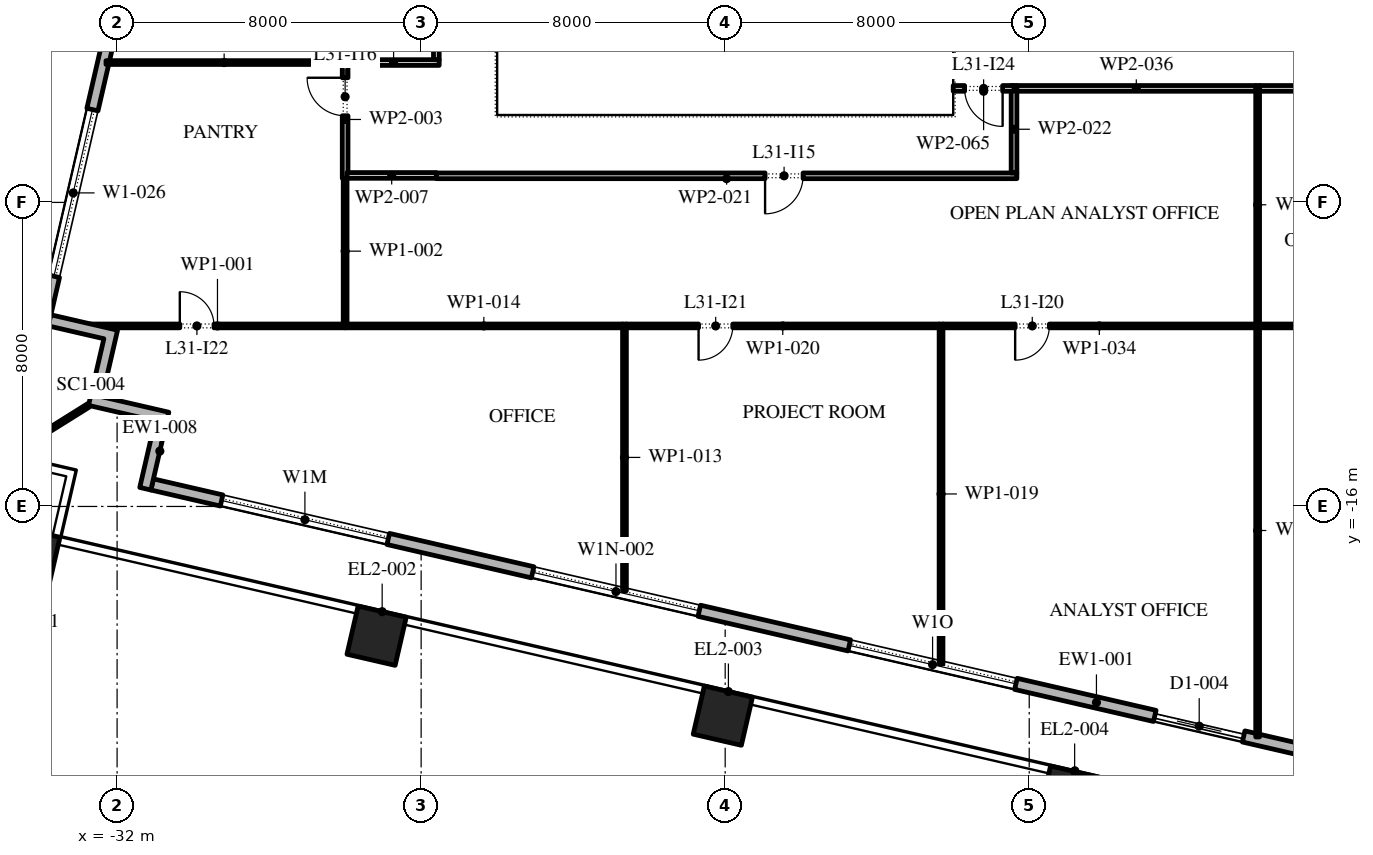
"""IFC4 building model, lengths in metres.
Left out: names, types, materials, properties, quantities, classifications, styles, units other than length and angle.
Written with IfcOpenShell. Run it as: python <this file> out.ifc"""

import sys

from ifc_helpers import new_model, si_unit, direction, frame, frame_2d, origin, origin_2d, place, context, subcontext, project, spatial, polyline, rectangle, outline, extrude, element, fill, save


model = new_model("IFC4")
c1 = context("Model", 3, precision=1e-05, world=origin(), true_north=direction((0.0, 1.0)))
c2 = subcontext(c1, "Body", "Model", "MODEL_VIEW")
j1 = project(units=[si_unit("LENGTHUNIT", "METRE"), si_unit("PLANEANGLEUNIT", "RADIAN")], contexts=[c1])
p1 = place(None, origin())
s1 = spatial("IfcSite", under=j1, at=p1, CompositionType="ELEMENT")
p2 = place(p1, origin())
s2 = spatial("IfcBuilding", under=s1, at=p2, CompositionType="ELEMENT")
p3 = place(p2, frame((0.0, 0.0, 143.4)))
s3 = spatial("IfcBuildingStorey", under=s2, at=p3, CompositionType="ELEMENT", Elevation=143.4)
for number, where, z_axis, x_axis in (
    (1, (-34.282, -17.298, 0.0), (0.0, 0.0, 1.0), (0.974, -0.225, 0.0)),
    (2, (-25.172, -19.402, 0.0), (0.0, 0.0, 1.0), (0.974, -0.225, 0.0)),
    (3, (-16.061, -21.505, 0.0), (0.0, 0.0, 1.0), (0.974, -0.225, 0.0)),
    (4, (-6.951, -23.608, 0.0), (0.0, 0.0, 1.0), (0.974, -0.225, 0.0)),
):
    element("IfcColumn", number, at=place(p3, frame(where, z_axis=z_axis, x_axis=x_axis)), inside=s3, PredefinedType="COLUMN", context=c2, shape_type="SweptSolid", body=[
        extrude(rectangle(XDim=1.3, YDim=1.3, at=origin_2d()), origin(), (0.0, 0.0, 1.0), 4.2),
    ])
p4 = place(p3, frame((-31.078, -15.421, 0.0), z_axis=(0.0, 0.0, 1.0), x_axis=(0.974370456532, -0.224949357493, 0.0)))
e5 = element("IfcWall", 5, at=p4, inside=s3, PredefinedType="STANDARD", context=c2, shape_type="SweptSolid", body=[
    extrude(rectangle(XDim=51.0, YDim=0.3, at=frame_2d((25.5, 0.0))), origin(), (0.0, 0.0, 1.0), 4.0),
])
p5 = place(p4, frame((1.875, 0.0, 0.45)))
e6 = element("IfcOpeningElement", 6, at=p5, cuts=e5, PredefinedType="OPENING", context=c2, shape_type="SweptSolid", body=[
    extrude(rectangle(XDim=4.5, YDim=2.575, at=frame_2d((2.25, 1.288))), frame((0.0, 0.16, 0.0), z_axis=(0.0, -1.0, 0.0), x_axis=(1.0, 0.0, 0.0)), (0.0, 0.0, 1.0), 0.32),
])
p6 = place(p4, frame((10.275, 0.0, 0.45)))
e7 = element("IfcOpeningElement", 7, at=p6, cuts=e5, PredefinedType="OPENING", context=c2, shape_type="SweptSolid", body=[
    extrude(rectangle(XDim=4.5, YDim=2.525, at=frame_2d((2.25, 1.262))), frame((0.0, 0.16, 0.0), z_axis=(0.0, -1.0, 0.0), x_axis=(1.0, 0.0, 0.0)), (0.0, 0.0, 1.0), 0.32),
])
p7 = place(p4, frame((18.825, 0.0, 0.45)))
e8 = element("IfcOpeningElement", 8, at=p7, cuts=e5, PredefinedType="OPENING", context=c2, shape_type="SweptSolid", body=[
    extrude(rectangle(XDim=4.5, YDim=2.5, at=frame_2d((2.25, 1.25))), frame((0.0, 0.16, 0.0), z_axis=(0.0, -1.0, 0.0), x_axis=(1.0, 0.0, 0.0)), (0.0, 0.0, 1.0), 0.32),
])
p8 = place(p4, frame((27.075, 0.0, 0.0)))
e9 = element("IfcOpeningElement", 9, at=p8, cuts=e5, PredefinedType="OPENING", context=c2, shape_type="SweptSolid", body=[
    extrude(rectangle(XDim=2.4, YDim=3.5, at=frame_2d((1.2, 1.75))), frame((0.0, 0.16, 0.0), z_axis=(0.0, -1.0, 0.0), x_axis=(1.0, 0.0, 0.0)), (0.0, 0.0, 1.0), 0.32),
])
p9 = place(p4, frame((35.925, 0.0, 0.45)))
e10 = element("IfcOpeningElement", 10, at=p9, cuts=e5, PredefinedType="OPENING", context=c2, shape_type="SweptSolid", body=[
    extrude(rectangle(XDim=4.5, YDim=2.45, at=frame_2d((2.25, 1.225))), frame((0.0, 0.16, 0.0), z_axis=(0.0, -1.0, 0.0), x_axis=(1.0, 0.0, 0.0)), (0.0, 0.0, 1.0), 0.32),
])
p10 = place(p4, frame((44.475, 0.0, 0.45)))
e11 = element("IfcOpeningElement", 11, at=p10, cuts=e5, PredefinedType="OPENING", context=c2, shape_type="SweptSolid", body=[
    extrude(rectangle(XDim=4.5, YDim=2.45, at=frame_2d((2.25, 1.225))), frame((0.0, 0.16, 0.0), z_axis=(0.0, -1.0, 0.0), x_axis=(1.0, 0.0, 0.0)), (0.0, 0.0, 1.0), 0.32),
])
p11 = place(p3, frame((-22.82, 37.016, 0.0), z_axis=(0.0, 0.0, 1.0), x_axis=(-0.224953880882, -0.974369412223, 0.0)))
e12 = element("IfcWall", 12, at=p11, inside=s3, PredefinedType="STANDARD", context=c2, shape_type="SweptSolid", body=[
    extrude(rectangle(XDim=49.5, YDim=0.3, at=frame_2d((24.75, 0.0))), origin(), (0.0, 0.0, 1.0), 4.0),
])
p12 = place(p11, frame((1.157, 0.0, 0.45)))
e13 = element("IfcOpeningElement", 13, at=p12, cuts=e12, PredefinedType="OPENING", context=c2, shape_type="SweptSolid", body=[
    extrude(rectangle(XDim=4.5, YDim=3.05, at=frame_2d((2.25, 1.525))), frame((0.0, 0.16, 0.0), z_axis=(0.0, -1.0, 0.0), x_axis=(1.0, 0.0, 0.0)), (0.0, 0.0, 1.0), 0.32),
])
p13 = place(p11, frame((8.121, 0.0, 0.45)))
e14 = element("IfcOpeningElement", 14, at=p13, cuts=e12, PredefinedType="OPENING", context=c2, shape_type="SweptSolid", body=[
    extrude(rectangle(XDim=4.5, YDim=3.05, at=frame_2d((2.25, 1.525))), frame((0.0, 0.16, 0.0), z_axis=(0.0, -1.0, 0.0), x_axis=(1.0, 0.0, 0.0)), (0.0, 0.0, 1.0), 0.32),
])
p14 = place(p11, frame((15.236, 0.0, 0.45)))
e15 = element("IfcOpeningElement", 15, at=p14, cuts=e12, PredefinedType="OPENING", context=c2, shape_type="SweptSolid", body=[
    extrude(rectangle(XDim=4.5, YDim=3.05, at=frame_2d((2.25, 1.525))), frame((0.0, 0.16, 0.0), z_axis=(0.0, -1.0, 0.0), x_axis=(1.0, 0.0, 0.0)), (0.0, 0.0, 1.0), 0.32),
])
p15 = place(p11, frame((23.4, 0.0, 0.0)))
e16 = element("IfcOpeningElement", 16, at=p15, cuts=e12, PredefinedType="OPENING", context=c2, shape_type="SweptSolid", body=[
    extrude(rectangle(XDim=2.4, YDim=3.5, at=frame_2d((1.2, 1.75))), frame((0.0, 0.16, 0.0), z_axis=(0.0, -1.0, 0.0), x_axis=(1.0, 0.0, 0.0)), (0.0, 0.0, 1.0), 0.32),
])
p16 = place(p11, frame((29.464, 0.0, 0.45)))
e17 = element("IfcOpeningElement", 17, at=p16, cuts=e12, PredefinedType="OPENING", context=c2, shape_type="SweptSolid", body=[
    extrude(rectangle(XDim=4.5, YDim=2.875, at=frame_2d((2.25, 1.438))), frame((0.0, 0.16, 0.0), z_axis=(0.0, -1.0, 0.0), x_axis=(1.0, 0.0, 0.0)), (0.0, 0.0, 1.0), 0.32),
])
p17 = place(p11, frame((36.579, 0.0, 0.45)))
e18 = element("IfcOpeningElement", 18, at=p17, cuts=e12, PredefinedType="OPENING", context=c2, shape_type="SweptSolid", body=[
    extrude(rectangle(XDim=4.5, YDim=2.675, at=frame_2d((2.25, 1.337))), frame((0.0, 0.16, 0.0), z_axis=(0.0, -1.0, 0.0), x_axis=(1.0, 0.0, 0.0)), (0.0, 0.0, 1.0), 0.32),
])
p18 = place(p11, frame((43.693, 0.0, 0.45)))
e19 = element("IfcOpeningElement", 19, at=p18, cuts=e12, PredefinedType="OPENING", context=c2, shape_type="SweptSolid", body=[
    extrude(rectangle(XDim=4.5, YDim=3.05, at=frame_2d((2.25, 1.525))), frame((0.0, 0.16, 0.0), z_axis=(0.0, -1.0, 0.0), x_axis=(1.0, 0.0, 0.0)), (0.0, 0.0, 1.0), 0.32),
])
p19 = place(p3, origin())
e20 = element("IfcWall", 20, at=p19, inside=s3, PredefinedType="STANDARD", context=c2, shape_type="SweptSolid", body=[
    extrude(outline(polyline([(-32.393, -13.116), (-30.639, -13.521), (-31.111, -15.567), (-31.404, -15.5), (-30.999, -13.746), (-32.753, -13.341), (-32.348, -11.587), (-33.809, -11.25), (-33.742, -10.957), (-31.988, -11.362), (-32.393, -13.116)])), origin(), (0.0, 0.0, 1.0), 4.0),
])
p20 = place(p3, frame((-32.753, -13.341, -0.05), z_axis=(0.0, 0.0, 1.0), x_axis=(-0.848059759764, -0.529900598103, 0.0)))
e21 = element("IfcWall", 21, at=p20, inside=s3, PredefinedType="STANDARD", context=c2, shape_type="SweptSolid", body=[
    extrude(rectangle(XDim=2.455, YDim=0.1, at=frame_2d((1.228, 0.0))), origin(), (0.0, 0.0, 1.0), 4.05),
])
p21 = place(p3, frame((-26.0, -11.25, 0.0), z_axis=(0.0, 0.0, 1.0), x_axis=(-1.0, 0.0, 0.0)))
e22 = element("IfcWall", 22, at=p21, inside=s3, PredefinedType="PARTITIONING", context=c2, shape_type="SweptSolid", body=[
    extrude(rectangle(XDim=6.718, YDim=0.1, at=frame_2d((3.359, 0.0))), origin(), (0.0, 0.0, 1.0), 4.0),
])
p22 = place(p21, frame((3.45, 0.0, 0.0)))
e23 = element("IfcOpeningElement", 23, at=p22, cuts=e22, PredefinedType="OPENING", context=c2, shape_type="SweptSolid", body=[
    extrude(rectangle(XDim=0.9, YDim=2.1, at=frame_2d((0.45, 1.05))), frame((0.0, 0.06, 0.0), z_axis=(0.0, -1.0, 0.0), x_axis=(1.0, 0.0, 0.0)), (0.0, 0.0, 1.0), 0.12),
])
p23 = place(p3, frame((-26.0, -11.2, 0.0), z_axis=(0.0, 0.0, 1.0), x_axis=(0.0, 1.0, 0.0)))
e24 = element("IfcWall", 24, at=p23, inside=s3, PredefinedType="PARTITIONING", context=c2, shape_type="SweptSolid", body=[
    extrude(rectangle(XDim=3.835, YDim=0.1, at=frame_2d((1.917, 0.0))), origin(), (0.0, 0.0, 1.0), 4.0),
])
p24 = place(p3, frame((-26.0, -7.365, 0.0), z_axis=(0.0, 0.0, 1.0), x_axis=(0.0, 1.0, 0.0)))
e25 = element("IfcWall", 25, at=p24, inside=s3, PredefinedType="PARTITIONING", context=c2, shape_type="SweptSolid", body=[
    extrude(rectangle(XDim=3.095, YDim=0.15, at=frame_2d((1.547, 0.0))), origin(), (0.0, 0.0, 1.0), 4.0),
])
p25 = place(p24, frame((1.645, 0.0, 0.0)))
e26 = element("IfcOpeningElement", 26, at=p25, cuts=e25, PredefinedType="OPENING", context=c2, shape_type="SweptSolid", body=[
    extrude(rectangle(XDim=1.0, YDim=2.1, at=frame_2d((0.5, 1.05))), frame((0.0, 0.085, 0.0), z_axis=(0.0, -1.0, 0.0), x_axis=(1.0, 0.0, 0.0)), (0.0, 0.0, 1.0), 0.17),
])
p26 = place(p3, frame((-26.075, -4.32, 0.0), z_axis=(0.0, 0.0, 1.0), x_axis=(-1.0, 0.0, 0.0)))
e27 = element("IfcWall", 27, at=p26, inside=s3, PredefinedType="PARTITIONING", context=c2, shape_type="SweptSolid", body=[
    extrude(rectangle(XDim=6.217, YDim=0.1, at=frame_2d((3.108, 0.0))), origin(), (0.0, 0.0, 1.0), 4.0),
])
p27 = place(p3, frame((-25.925, -4.32, 0.0), z_axis=(0.0, 0.0, 1.0), x_axis=(1.0, 0.0, 0.0)))
e28 = element("IfcWall", 28, at=p27, inside=s3, PredefinedType="PARTITIONING", context=c2, shape_type="SweptSolid", body=[
    extrude(rectangle(XDim=2.4, YDim=0.15, at=frame_2d((1.2, 0.0))), origin(), (0.0, 0.0, 1.0), 4.0),
])
p28 = place(p3, frame((-23.6, -7.29, 0.0), z_axis=(0.0, 0.0, 1.0), x_axis=(-1.0, 0.0, 0.0)))
e29 = element("IfcWall", 29, at=p28, inside=s3, PredefinedType="PARTITIONING", context=c2, shape_type="SweptSolid", body=[
    extrude(rectangle(XDim=2.35, YDim=0.15, at=frame_2d((1.175, 0.0))), origin(), (0.0, 0.0, 1.0), 4.0),
])
p29 = place(p3, frame((-23.6, -4.245, 0.0), z_axis=(0.0, 0.0, 1.0), x_axis=(0.0, 1.0, 0.0)))
e30 = element("IfcWall", 30, at=p29, inside=s3, PredefinedType="PARTITIONING", context=c2, shape_type="SweptSolid", body=[
    extrude(rectangle(XDim=14.685, YDim=0.15, at=frame_2d((7.343, 0.0))), origin(), (0.0, 0.0, 1.0), 4.0),
])
p30 = place(p29, frame((3.735, 0.0, 0.0)))
e31 = element("IfcOpeningElement", 31, at=p30, cuts=e30, PredefinedType="OPENING", context=c2, shape_type="SweptSolid", body=[
    extrude(rectangle(XDim=1.0, YDim=2.1, at=frame_2d((0.5, 1.05))), frame((0.0, 0.085, 0.0), z_axis=(0.0, -1.0, 0.0), x_axis=(1.0, 0.0, 0.0)), (0.0, 0.0, 1.0), 0.17),
])
p31 = place(p3, frame((-18.65, -18.219, 0.0), z_axis=(0.0, 0.0, 1.0), x_axis=(0.0, 1.0, 0.0)))
e32 = element("IfcWall", 32, at=p31, inside=s3, PredefinedType="PARTITIONING", context=c2, shape_type="SweptSolid", body=[
    extrude(rectangle(XDim=7.019, YDim=0.1, at=frame_2d((3.51, 0.0))), origin(), (0.0, 0.0, 1.0), 4.0),
])
p32 = place(p3, frame((-18.7, -11.25, 0.0), z_axis=(0.0, 0.0, 1.0), x_axis=(-1.0, 0.0, 0.0)))
e33 = element("IfcWall", 33, at=p32, inside=s3, PredefinedType="PARTITIONING", context=c2, shape_type="SweptSolid", body=[
    extrude(rectangle(XDim=7.3, YDim=0.1, at=frame_2d((3.65, 0.0))), origin(), (0.0, 0.0, 1.0), 4.0),
])
p33 = place(p3, frame((-10.32, -20.142, 0.0), z_axis=(0.0, 0.0, 1.0), x_axis=(0.0, 1.0, 0.0)))
e34 = element("IfcWall", 34, at=p33, inside=s3, PredefinedType="PARTITIONING", context=c2, shape_type="SweptSolid", body=[
    extrude(rectangle(XDim=8.942, YDim=0.1, at=frame_2d((4.471, 0.0))), origin(), (0.0, 0.0, 1.0), 4.0),
])
p34 = place(p3, frame((-10.37, -11.25, 0.0), z_axis=(0.0, 0.0, 1.0), x_axis=(-1.0, 0.0, 0.0)))
e35 = element("IfcWall", 35, at=p34, inside=s3, PredefinedType="PARTITIONING", context=c2, shape_type="SweptSolid", body=[
    extrude(rectangle(XDim=8.23, YDim=0.1, at=frame_2d((4.115, 0.0))), origin(), (0.0, 0.0, 1.0), 4.0),
])
p35 = place(p34, frame((5.43, 0.0, 0.0)))
e36 = element("IfcOpeningElement", 36, at=p35, cuts=e35, PredefinedType="OPENING", context=c2, shape_type="SweptSolid", body=[
    extrude(rectangle(XDim=0.9, YDim=2.1, at=frame_2d((0.45, 1.05))), frame((0.0, 0.06, 0.0), z_axis=(0.0, -1.0, 0.0), x_axis=(1.0, 0.0, 0.0)), (0.0, 0.0, 1.0), 0.12),
])
p36 = place(p3, frame((-8.325, -7.3, 0.0), z_axis=(0.0, 0.0, 1.0), x_axis=(-1.0, 0.0, 0.0)))
e37 = element("IfcWall", 37, at=p36, inside=s3, PredefinedType="PARTITIONING", context=c2, shape_type="SweptSolid", body=[
    extrude(rectangle(XDim=15.275, YDim=0.15, at=frame_2d((7.638, 0.0))), origin(), (0.0, 0.0, 1.0), 4.0),
])
p37 = place(p36, frame((5.625, 0.0, 0.0)))
e38 = element("IfcOpeningElement", 38, at=p37, cuts=e37, PredefinedType="OPENING", context=c2, shape_type="SweptSolid", body=[
    extrude(rectangle(XDim=1.0, YDim=2.1, at=frame_2d((0.5, 1.05))), frame((0.0, 0.085, 0.0), z_axis=(0.0, -1.0, 0.0), x_axis=(1.0, 0.0, 0.0)), (0.0, 0.0, 1.0), 0.17),
])
p38 = place(p3, frame((-8.4, -4.925, 0.0), z_axis=(0.0, 0.0, 1.0), x_axis=(0.0, -1.0, 0.0)))
e39 = element("IfcWall", 39, at=p38, inside=s3, PredefinedType="PARTITIONING", context=c2, shape_type="SweptSolid", body=[
    extrude(rectangle(XDim=2.3, YDim=0.15, at=frame_2d((1.15, 0.0))), origin(), (0.0, 0.0, 1.0), 4.0),
])
p39 = place(p3, frame((-1.99, -22.065, 0.0), z_axis=(0.0, 0.0, 1.0), x_axis=(0.0, 1.0, 0.0)))
e40 = element("IfcWall", 40, at=p39, inside=s3, PredefinedType="PARTITIONING", context=c2, shape_type="SweptSolid", body=[
    extrude(rectangle(XDim=10.865, YDim=0.1, at=frame_2d((5.433, 0.0))), origin(), (0.0, 0.0, 1.0), 3.02),
])
p40 = place(p3, frame((-2.04, -11.25, 0.0), z_axis=(0.0, 0.0, 1.0), x_axis=(-1.0, 0.0, 0.0)))
e41 = element("IfcWall", 41, at=p40, inside=s3, PredefinedType="PARTITIONING", context=c2, shape_type="SweptSolid", body=[
    extrude(rectangle(XDim=8.23, YDim=0.1, at=frame_2d((4.115, 0.0))), origin(), (0.0, 0.0, 1.0), 4.0),
])
p41 = place(p40, frame((5.43, 0.0, 0.0)))
e42 = element("IfcOpeningElement", 42, at=p41, cuts=e41, PredefinedType="OPENING", context=c2, shape_type="SweptSolid", body=[
    extrude(rectangle(XDim=0.9, YDim=2.1, at=frame_2d((0.45, 1.05))), frame((0.0, 0.06, 0.0), z_axis=(0.0, -1.0, 0.0), x_axis=(1.0, 0.0, 0.0)), (0.0, 0.0, 1.0), 0.12),
])
p42 = place(p3, frame((-1.99, -11.2, 0.0), z_axis=(0.0, 0.0, 1.0), x_axis=(0.0, 1.0, 0.0)))
e43 = element("IfcWall", 43, at=p42, inside=s3, PredefinedType="PARTITIONING", context=c2, shape_type="SweptSolid", body=[
    extrude(rectangle(XDim=6.275, YDim=0.1, at=frame_2d((3.137, 0.0))), origin(), (0.0, 0.0, 1.0), 3.02),
])
p43 = place(p3, frame((-2.04, -5.0, 0.0), z_axis=(0.0, 0.0, 1.0), x_axis=(-1.0, 0.0, 0.0)))
e44 = element("IfcWall", 44, at=p43, inside=s3, PredefinedType="PARTITIONING", context=c2, shape_type="SweptSolid", body=[
    extrude(rectangle(XDim=6.285, YDim=0.15, at=frame_2d((3.143, 0.0))), origin(), (0.0, 0.0, 1.0), 4.0),
])
p44 = place(p3, frame((8.325, -5.0, 0.0), z_axis=(0.0, 0.0, 1.0), x_axis=(-1.0, 0.0, 0.0)))
e45 = element("IfcWall", 45, at=p44, inside=s3, PredefinedType="PARTITIONING", context=c2, shape_type="SweptSolid", body=[
    extrude(rectangle(XDim=10.265, YDim=0.15, at=frame_2d((5.132, 0.0))), origin(), (0.0, 0.0, 1.0), 4.0),
])
p45 = place(p44, frame((4.665, 0.0, 0.0)))
e46 = element("IfcOpeningElement", 46, at=p45, cuts=e45, PredefinedType="OPENING", context=c2, shape_type="SweptSolid", body=[
    extrude(rectangle(XDim=1.0, YDim=2.1, at=frame_2d((0.5, 1.05))), frame((0.0, 0.085, 0.0), z_axis=(0.0, -1.0, 0.0), x_axis=(1.0, 0.0, 0.0)), (0.0, 0.0, 1.0), 0.17),
])
p46 = place(p3, frame((10.05, -11.25, 0.0), z_axis=(0.0, 0.0, 1.0), x_axis=(-1.0, 0.0, 0.0)))
e47 = element("IfcWall", 47, at=p46, inside=s3, PredefinedType="PARTITIONING", context=c2, shape_type="SweptSolid", body=[
    extrude(rectangle(XDim=11.99, YDim=0.1, at=frame_2d((5.995, 0.0))), origin(), (0.0, 0.0, 1.0), 4.0),
])
p47 = place(p46, frame((4.44, 0.0, 0.0)))
e48 = element("IfcOpeningElement", 48, at=p47, cuts=e47, PredefinedType="OPENING", context=c2, shape_type="SweptSolid", body=[
    extrude(rectangle(XDim=0.9, YDim=2.1, at=frame_2d((0.45, 1.05))), frame((0.0, 0.06, 0.0), z_axis=(0.0, -1.0, 0.0), x_axis=(1.0, 0.0, 0.0)), (0.0, 0.0, 1.0), 0.12),
])
p48 = place(p3, frame((-8.4, -5.0, 0.0), z_axis=(0.0, 0.0, 1.0), x_axis=(-1.0, 0.0, 0.0)))
e49 = element("IfcWall", 49, at=p48, inside=s3, PredefinedType="PARTITIONING", context=c2, shape_type="SweptSolid", body=[
    extrude(rectangle(XDim=1.6, YDim=0.15, at=frame_2d((0.8, 0.0))), origin(), (0.0, 0.0, 1.0), 4.0),
])
p49 = place(p48, frame((0.3, 0.0, 0.0)))
e50 = element("IfcOpeningElement", 50, at=p49, cuts=e49, PredefinedType="OPENING", context=c2, shape_type="SweptSolid", body=[
    extrude(rectangle(XDim=1.0, YDim=2.1, at=frame_2d((0.5, 1.05))), frame((0.0, 0.085, 0.0), z_axis=(0.0, -1.0, 0.0), x_axis=(1.0, 0.0, 0.0)), (0.0, 0.0, 1.0), 0.17),
])
p50 = place(p5, origin())
e51 = element("IfcWindow", 51, at=p50, inside=s3, PartitioningType="DOUBLE_PANEL_VERTICAL", PredefinedType="WINDOW", context=c2, shape_type="SweptSolid", body=[
    extrude(rectangle(XDim=4.5, YDim=2.575, at=frame_2d((2.25, 1.288))), frame((0.0, 0.03, 0.0), z_axis=(0.0, -1.0, 0.0), x_axis=(1.0, 0.0, 0.0)), (0.0, 0.0, 1.0), 0.06),
])
fill(e6, e51)
p51 = place(p6, origin())
e52 = element("IfcWindow", 52, at=p51, inside=s3, PartitioningType="DOUBLE_PANEL_VERTICAL", PredefinedType="WINDOW", context=c2, shape_type="SweptSolid", body=[
    extrude(rectangle(XDim=4.5, YDim=2.525, at=frame_2d((2.25, 1.262))), frame((0.0, 0.03, 0.0), z_axis=(0.0, -1.0, 0.0), x_axis=(1.0, 0.0, 0.0)), (0.0, 0.0, 1.0), 0.06),
])
fill(e7, e52)
p52 = place(p7, origin())
e53 = element("IfcWindow", 53, at=p52, inside=s3, PartitioningType="DOUBLE_PANEL_VERTICAL", PredefinedType="WINDOW", context=c2, shape_type="SweptSolid", body=[
    extrude(rectangle(XDim=4.5, YDim=2.5, at=frame_2d((2.25, 1.25))), frame((0.0, 0.03, 0.0), z_axis=(0.0, -1.0, 0.0), x_axis=(1.0, 0.0, 0.0)), (0.0, 0.0, 1.0), 0.06),
])
fill(e8, e53)
p53 = place(p8, origin())
e54 = element("IfcDoor", 54, at=p53, inside=s3, OperationType="DOUBLE_DOOR_SLIDING", PredefinedType="DOOR", context=c2, shape_type="SweptSolid", body=[
    extrude(rectangle(XDim=2.4, YDim=3.5, at=frame_2d((1.2, 1.75))), frame((0.0, 0.025, 0.0), z_axis=(0.0, -1.0, 0.0), x_axis=(1.0, 0.0, 0.0)), (0.0, 0.0, 1.0), 0.05),
])
fill(e9, e54)
p54 = place(p18, origin())
e55 = element("IfcWindow", 55, at=p54, inside=s3, PartitioningType="DOUBLE_PANEL_VERTICAL", PredefinedType="WINDOW", context=c2, shape_type="SweptSolid", body=[
    extrude(rectangle(XDim=4.5, YDim=3.05, at=frame_2d((2.25, 1.525))), frame((0.0, 0.03, 0.0), z_axis=(0.0, -1.0, 0.0), x_axis=(1.0, 0.0, 0.0)), (0.0, 0.0, 1.0), 0.06),
])
fill(e19, e55)
p55 = place(p37, origin())
e56 = element("IfcDoor", 56, at=p55, inside=s3, OperationType="SINGLE_SWING_LEFT", PredefinedType="DOOR", context=c2, shape_type="SweptSolid", body=[
    extrude(rectangle(XDim=1.0, YDim=2.1, at=frame_2d((0.5, 1.05))), frame((0.0, 0.025, 0.0), z_axis=(0.0, -1.0, 0.0), x_axis=(1.0, 0.0, 0.0)), (0.0, 0.0, 1.0), 0.05),
])
fill(e38, e56)
p56 = place(p25, origin())
e57 = element("IfcDoor", 57, at=p56, inside=s3, OperationType="SINGLE_SWING_LEFT", PredefinedType="DOOR", context=c2, shape_type="SweptSolid", body=[
    extrude(rectangle(XDim=1.0, YDim=2.1, at=frame_2d((0.5, 1.05))), frame((0.0, 0.025, 0.0), z_axis=(0.0, -1.0, 0.0), x_axis=(1.0, 0.0, 0.0)), (0.0, 0.0, 1.0), 0.05),
])
fill(e26, e57)
p57 = place(p41, origin())
e58 = element("IfcDoor", 58, at=p57, inside=s3, OperationType="SINGLE_SWING_LEFT", PredefinedType="DOOR", context=c2, shape_type="SweptSolid", body=[
    extrude(rectangle(XDim=0.9, YDim=2.1, at=frame_2d((0.45, 1.05))), frame((0.0, 0.025, 0.0), z_axis=(0.0, -1.0, 0.0), x_axis=(1.0, 0.0, 0.0)), (0.0, 0.0, 1.0), 0.05),
])
fill(e42, e58)
p58 = place(p35, origin())
e59 = element("IfcDoor", 59, at=p58, inside=s3, OperationType="SINGLE_SWING_LEFT", PredefinedType="DOOR", context=c2, shape_type="SweptSolid", body=[
    extrude(rectangle(XDim=0.9, YDim=2.1, at=frame_2d((0.45, 1.05))), frame((0.0, 0.025, 0.0), z_axis=(0.0, -1.0, 0.0), x_axis=(1.0, 0.0, 0.0)), (0.0, 0.0, 1.0), 0.05),
])
fill(e36, e59)
p59 = place(p22, frame((0.9, 0.0, 0.0), z_axis=(0.0, 0.0, 1.0), x_axis=(-1.0, 0.0, 0.0)))
e60 = element("IfcDoor", 60, at=p59, inside=s3, OperationType="SINGLE_SWING_RIGHT", PredefinedType="DOOR", context=c2, shape_type="SweptSolid", body=[
    extrude(rectangle(XDim=0.9, YDim=2.1, at=frame_2d((0.45, 1.05))), frame((0.0, 0.025, 0.0), z_axis=(0.0, -1.0, 0.0), x_axis=(1.0, 0.0, 0.0)), (0.0, 0.0, 1.0), 0.05),
])
fill(e23, e60)
p60 = place(p49, origin())
e61 = element("IfcDoor", 61, at=p60, inside=s3, OperationType="SINGLE_SWING_RIGHT", PredefinedType="DOOR", context=c2, shape_type="SweptSolid", body=[
    extrude(rectangle(XDim=1.0, YDim=2.1, at=frame_2d((0.5, 1.05))), frame((0.0, 0.025, 0.0), z_axis=(0.0, -1.0, 0.0), x_axis=(1.0, 0.0, 0.0)), (0.0, 0.0, 1.0), 0.05),
])
fill(e50, e61)
save(model, sys.argv[1])
